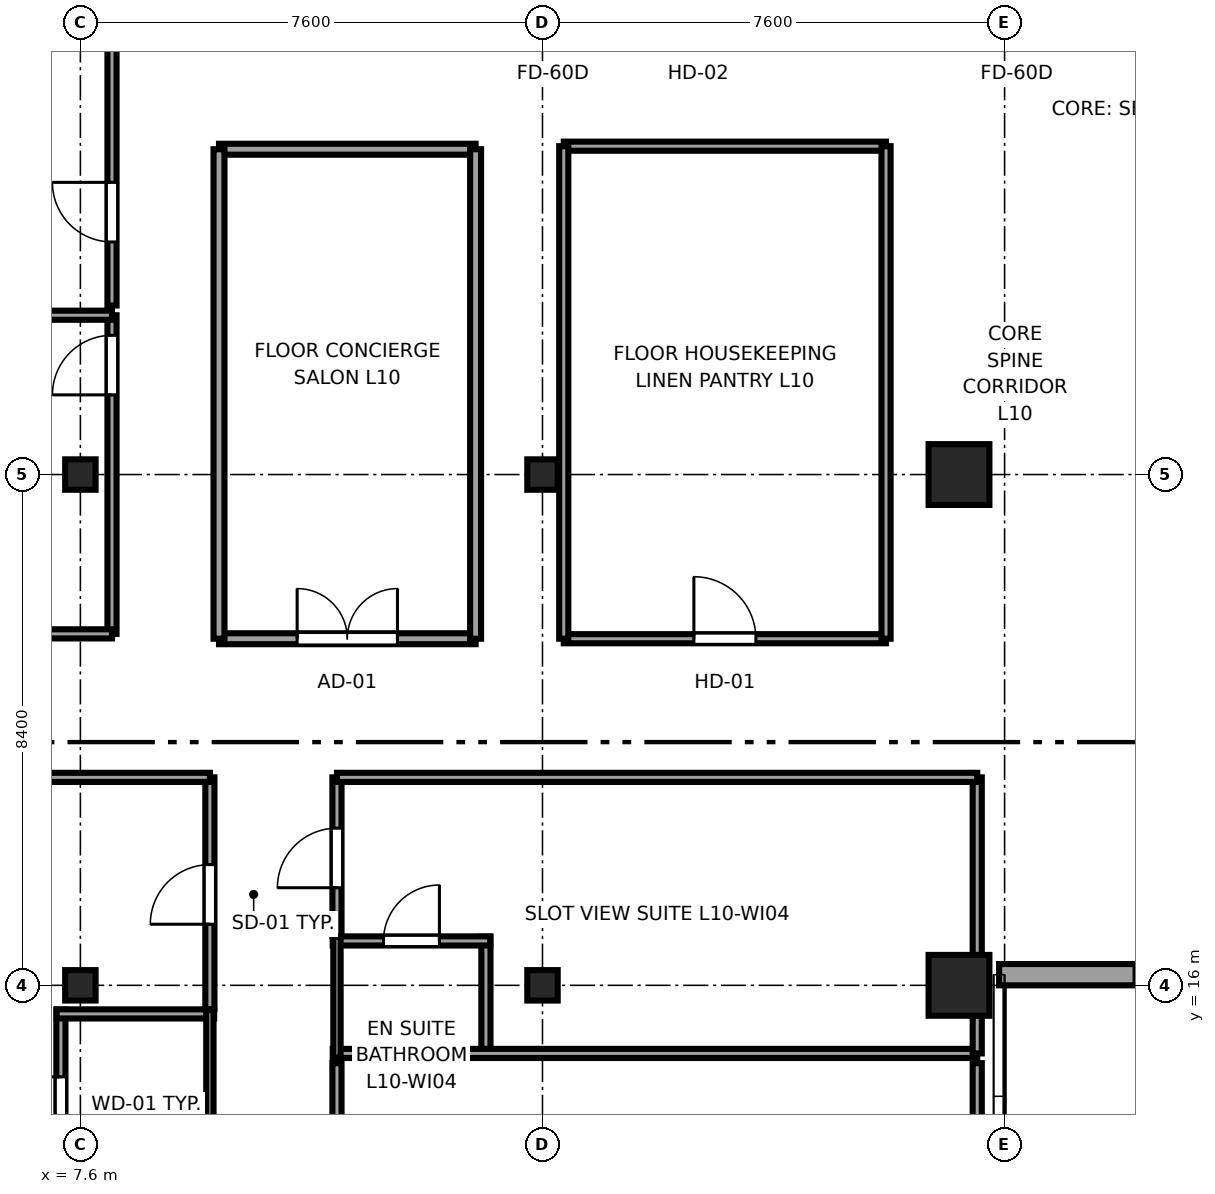
"""IFC4 building model, lengths in metres.
Left out: names, types, materials, properties, quantities, classifications, styles, units other than length and angle.
Written with IfcOpenShell. Run it as: python <this file> out.ifc"""

import sys

from ifc_helpers import new_model, si_unit, direction, frame, frame_2d, origin, origin_2d, place, context, subcontext, project, spatial, rectangle, i_section, extrude, source, transform, mapped, element, fill, save


model = new_model("IFC4")
c1 = context("Model", 3, precision=1e-05, world=origin(), true_north=direction((0.0, 1.0)))
c2 = subcontext(c1, "Body", "Model", "MODEL_VIEW")
j1 = project(units=[si_unit("LENGTHUNIT", "METRE"), si_unit("PLANEANGLEUNIT", "RADIAN")], contexts=[c1])
p1 = place(None, origin())
s1 = spatial("IfcSite", under=j1, at=p1, CompositionType="ELEMENT")
p2 = place(p1, origin())
s2 = spatial("IfcBuilding", under=s1, at=p2, CompositionType="ELEMENT")
p3 = place(p2, frame((0.0, 0.0, 46.2)))
s3 = spatial("IfcBuildingStorey", under=s2, at=p3, CompositionType="ELEMENT", Elevation=46.2)
m1 = source(origin(), c2, "Body", "SweptSolid", [
    extrude(i_section(OverallWidth=0.5, OverallDepth=0.5, WebThickness=0.028, FlangeThickness=0.045, at=origin_2d()), origin(), (0.0, 0.0, 1.0), 3.55),
])
for number, where, z_axis, x_axis in (
    (1, (7.6, 16.0, 0.0), (0.0, 0.0, 1.0), (1.0, 0.0, 0.0)),
    (2, (7.6, 24.4, 0.0), (0.0, 0.0, 1.0), (1.0, 0.0, 0.0)),
    (3, (15.2, 16.0, 0.0), (0.0, 0.0, 1.0), (1.0, 0.0, 0.0)),
    (4, (15.2, 24.4, 0.0), (0.0, 0.0, 1.0), (1.0, 0.0, 0.0)),
):
    element("IfcColumn", number, at=place(p3, frame(where, z_axis=z_axis, x_axis=x_axis)), inside=s3, PredefinedType="COLUMN", context=c2, shape_type="MappedRepresentation", body=[
        mapped(m1, transform((0.0, 0.0, 0.0), x_axis=(1.0, 0.0, 0.0), y_axis=(0.0, 1.0, 0.0), z_axis=(0.0, 0.0, 1.0), scale=1.0)),
    ])
m2 = source(origin(), c2, "Body", "SweptSolid", [
    extrude(rectangle(XDim=1.0, YDim=1.0, at=origin_2d()), origin(), (0.0, 0.0, 1.0), 3.55),
])
for number, where, z_axis, x_axis in (
    (5, (22.05, 16.0, 0.0), (0.0, 0.0, 1.0), (1.0, 0.0, 0.0)),
    (6, (22.05, 24.4, 0.0), (0.0, 0.0, 1.0), (1.0, 0.0, 0.0)),
):
    element("IfcColumn", number, at=place(p3, frame(where, z_axis=z_axis, x_axis=x_axis)), inside=s3, PredefinedType="COLUMN", context=c2, shape_type="MappedRepresentation", body=[
        mapped(m2, transform((0.0, 0.0, 0.0), x_axis=(1.0, 0.0, 0.0), y_axis=(0.0, 1.0, 0.0), z_axis=(0.0, 0.0, 1.0), scale=1.0)),
    ])
p4 = place(p3, frame((22.71, 16.175, 0.0), z_axis=(0.0, 0.0, 1.0), x_axis=(1.0, 0.0, 0.0)))
e7 = element("IfcWall", 7, at=p4, inside=s3, PredefinedType="SOLIDWALL", context=c2, shape_type="SweptSolid", body=[
    extrude(rectangle(XDim=11.58, YDim=0.35, at=frame_2d((5.79, 0.0))), origin(), (0.0, 0.0, 1.0), 2.748),
])
p5 = place(p4, frame((2.22, 0.0, 0.68)))
e8 = element("IfcOpeningElement", 8, at=p5, cuts=e7, PredefinedType="OPENING", context=c2, shape_type="SweptSolid", body=[
    extrude(rectangle(XDim=1.95, YDim=1.82, at=frame_2d((0.975, 0.91))), frame((0.0, 0.185, 0.0), z_axis=(0.0, -1.0, 0.0), x_axis=(1.0, 0.0, 0.0)), (0.0, 0.0, 1.0), 0.37),
])
p6 = place(p4, frame((7.41, 0.0, 0.68)))
e9 = element("IfcOpeningElement", 9, at=p6, cuts=e7, PredefinedType="OPENING", context=c2, shape_type="SweptSolid", body=[
    extrude(rectangle(XDim=1.95, YDim=1.82, at=frame_2d((0.975, 0.91))), frame((0.0, 0.185, 0.0), z_axis=(0.0, -1.0, 0.0), x_axis=(1.0, 0.0, 0.0)), (0.0, 0.0, 1.0), 0.37),
])
p7 = place(p3, frame((7.28, 13.21, 0.0), z_axis=(0.0, 0.0, 1.0), x_axis=(0.0, 1.0, 0.0)))
e10 = element("IfcWall", 10, at=p7, inside=s3, PredefinedType="PARTITIONING", context=c2, shape_type="SweptSolid", body=[
    extrude(rectangle(XDim=2.39, YDim=0.15, at=frame_2d((1.195, 0.0))), origin(), (0.0, 0.0, 1.0), 3.37),
])
p8 = place(p7, frame((0.365, 0.0, 0.0)))
e11 = element("IfcOpeningElement", 11, at=p8, cuts=e10, PredefinedType="OPENING", context=c2, shape_type="SweptSolid", body=[
    extrude(rectangle(XDim=0.92, YDim=2.01, at=frame_2d((0.46, 1.005))), frame((0.0, 0.085, 0.0), z_axis=(0.0, -1.0, 0.0), x_axis=(1.0, 0.0, 0.0)), (0.0, 0.0, 1.0), 0.17),
])
p9 = place(p3, frame((7.21, 15.53, 0.0), z_axis=(0.0, 0.0, 1.0), x_axis=(1.0, 0.0, 0.0)))
e12 = element("IfcWall", 12, at=p9, inside=s3, PredefinedType="PARTITIONING", context=c2, shape_type="SweptSolid", body=[
    extrude(rectangle(XDim=2.59, YDim=0.15, at=frame_2d((1.295, 0.0))), origin(), (0.0, 0.0, 1.0), 3.37),
])
p10 = place(p3, frame((9.73, 13.21, 0.0), z_axis=(0.0, 0.0, 1.0), x_axis=(0.0, 1.0, 0.0)))
e13 = element("IfcWall", 13, at=p10, inside=s3, PredefinedType="PLUMBINGWALL", context=c2, shape_type="SweptSolid", body=[
    extrude(rectangle(XDim=2.39, YDim=0.12, at=frame_2d((1.195, 0.0))), origin(), (0.0, 0.0, 1.0), 3.37),
])
p11 = place(p3, frame((14.27, 14.81, 0.0), z_axis=(0.0, 0.0, 1.0), x_axis=(0.0, 1.0, 0.0)))
e14 = element("IfcWall", 14, at=p11, inside=s3, PredefinedType="PARTITIONING", context=c2, shape_type="SweptSolid", body=[
    extrude(rectangle(XDim=1.99, YDim=0.15, at=frame_2d((0.995, 0.0))), origin(), (0.0, 0.0, 1.0), 3.37),
])
p12 = place(p3, frame((11.75, 14.88, 0.0), z_axis=(0.0, 0.0, 1.0), x_axis=(1.0, 0.0, 0.0)))
e15 = element("IfcWall", 15, at=p12, inside=s3, PredefinedType="PARTITIONING", context=c2, shape_type="SweptSolid", body=[
    extrude(rectangle(XDim=10.6, YDim=0.15, at=frame_2d((5.3, 0.0))), origin(), (0.0, 0.0, 1.0), 3.37),
])
p13 = place(p3, frame((11.75, 16.73, 0.0), z_axis=(0.0, 0.0, 1.0), x_axis=(1.0, 0.0, 0.0)))
e16 = element("IfcWall", 16, at=p13, inside=s3, PredefinedType="PARTITIONING", context=c2, shape_type="SweptSolid", body=[
    extrude(rectangle(XDim=2.59, YDim=0.15, at=frame_2d((1.295, 0.0))), origin(), (0.0, 0.0, 1.0), 3.37),
])
p14 = place(p13, frame((0.835, 0.0, 0.0)))
e17 = element("IfcOpeningElement", 17, at=p14, cuts=e16, PredefinedType="OPENING", context=c2, shape_type="SweptSolid", body=[
    extrude(rectangle(XDim=0.92, YDim=2.01, at=frame_2d((0.46, 1.005))), frame((0.0, 0.085, 0.0), z_axis=(0.0, -1.0, 0.0), x_axis=(1.0, 0.0, 0.0)), (0.0, 0.0, 1.0), 0.17),
])
p15 = place(p3, frame((11.82, 14.81, 0.0), z_axis=(0.0, 0.0, 1.0), x_axis=(0.0, 1.0, 0.0)))
e18 = element("IfcWall", 18, at=p15, inside=s3, PredefinedType="PLUMBINGWALL", context=c2, shape_type="SweptSolid", body=[
    extrude(rectangle(XDim=1.99, YDim=0.12, at=frame_2d((0.995, 0.0))), origin(), (0.0, 0.0, 1.0), 3.37),
])
p16 = place(p3, frame((9.73, 15.61, 0.0), z_axis=(0.0, 0.0, 1.0), x_axis=(0.0, 1.0, 0.0)))
e19 = element("IfcWall", 19, at=p16, inside=s3, PredefinedType="PARTITIONING", context=c2, shape_type="SweptSolid", body=[
    extrude(rectangle(XDim=3.81, YDim=0.15, at=frame_2d((1.905, 0.0))), origin(), (0.0, 0.0, 1.0), 3.37),
])
p17 = place(p16, frame((1.395, 0.0, 0.0)))
e20 = element("IfcOpeningElement", 20, at=p17, cuts=e19, PredefinedType="OPENING", context=c2, shape_type="SweptSolid", body=[
    extrude(rectangle(XDim=0.98, YDim=2.12, at=frame_2d((0.49, 1.06))), frame((0.0, 0.085, 0.0), z_axis=(0.0, -1.0, 0.0), x_axis=(1.0, 0.0, 0.0)), (0.0, 0.0, 1.0), 0.17),
])
p18 = place(p3, frame((0.405, 19.42, 0.0), z_axis=(0.0, 0.0, 1.0), x_axis=(1.0, 0.0, 0.0)))
e21 = element("IfcWall", 21, at=p18, inside=s3, PredefinedType="PARTITIONING", context=c2, shape_type="SweptSolid", body=[
    extrude(rectangle(XDim=9.325, YDim=0.15, at=frame_2d((4.663, 0.0))), origin(), (0.0, 0.0, 1.0), 3.37),
])
p19 = place(p3, frame((11.82, 12.01, 0.0), z_axis=(0.0, 0.0, 1.0), x_axis=(0.0, 1.0, 0.0)))
e22 = element("IfcWall", 22, at=p19, inside=s3, PredefinedType="PARTITIONING", context=c2, shape_type="SweptSolid", body=[
    extrude(rectangle(XDim=2.71, YDim=0.15, at=frame_2d((1.355, 0.0))), origin(), (0.0, 0.0, 1.0), 3.37),
])
p20 = place(p19, frame((0.845, 0.0, 0.0)))
e23 = element("IfcOpeningElement", 23, at=p20, cuts=e22, PredefinedType="OPENING", context=c2, shape_type="SweptSolid", body=[
    extrude(rectangle(XDim=0.98, YDim=2.12, at=frame_2d((0.49, 1.06))), frame((0.0, 0.085, 0.0), z_axis=(0.0, -1.0, 0.0), x_axis=(1.0, 0.0, 0.0)), (0.0, 0.0, 1.0), 0.17),
])
p21 = place(p3, frame((22.35, 10.08, 0.0), z_axis=(0.0, 0.0, 1.0), x_axis=(0.0, 1.0, 0.0)))
e24 = element("IfcWall", 24, at=p21, inside=s3, PredefinedType="PARTITIONING", context=c2, shape_type="SweptSolid", body=[
    extrude(rectangle(XDim=4.64, YDim=0.15, at=frame_2d((2.32, 0.0))), origin(), (0.0, 0.0, 1.0), 3.37),
])
p22 = place(p3, frame((11.82, 16.81, 0.0), z_axis=(0.0, 0.0, 1.0), x_axis=(0.0, 1.0, 0.0)))
e25 = element("IfcWall", 25, at=p22, inside=s3, PredefinedType="PARTITIONING", context=c2, shape_type="SweptSolid", body=[
    extrude(rectangle(XDim=2.61, YDim=0.15, at=frame_2d((1.305, 0.0))), origin(), (0.0, 0.0, 1.0), 3.37),
])
p23 = place(p22, frame((0.795, 0.0, 0.0)))
e26 = element("IfcOpeningElement", 26, at=p23, cuts=e25, PredefinedType="OPENING", context=c2, shape_type="SweptSolid", body=[
    extrude(rectangle(XDim=0.98, YDim=2.12, at=frame_2d((0.49, 1.06))), frame((0.0, 0.085, 0.0), z_axis=(0.0, -1.0, 0.0), x_axis=(1.0, 0.0, 0.0)), (0.0, 0.0, 1.0), 0.17),
])
p24 = place(p3, frame((22.35, 14.88, 0.0), z_axis=(0.0, 0.0, 1.0), x_axis=(0.0, 1.0, 0.0)))
e27 = element("IfcWall", 27, at=p24, inside=s3, PredefinedType="PARTITIONING", context=c2, shape_type="SweptSolid", body=[
    extrude(rectangle(XDim=4.54, YDim=0.15, at=frame_2d((2.27, 0.0))), origin(), (0.0, 0.0, 1.0), 3.37),
])
p25 = place(p3, frame((11.82, 19.42, 0.0), z_axis=(0.0, 0.0, 1.0), x_axis=(1.0, 0.0, 0.0)))
e28 = element("IfcWall", 28, at=p25, inside=s3, PredefinedType="PARTITIONING", context=c2, shape_type="SweptSolid", body=[
    extrude(rectangle(XDim=10.53, YDim=0.15, at=frame_2d((5.265, 0.0))), origin(), (0.0, 0.0, 1.0), 3.37),
])
p26 = place(p3, frame((8.12, 21.78, 0.0), z_axis=(0.0, 0.0, 1.0), x_axis=(0.0, 1.0, 0.0)))
e29 = element("IfcWall", 29, at=p26, inside=s3, PredefinedType="PARTITIONING", context=c2, shape_type="SweptSolid", body=[
    extrude(rectangle(XDim=5.24, YDim=0.15, at=frame_2d((2.62, 0.0))), origin(), (0.0, 0.0, 1.0), 3.37),
])
p27 = place(p26, frame((3.93, 0.0, 0.0)))
e30 = element("IfcOpeningElement", 30, at=p27, cuts=e29, PredefinedType="OPENING", context=c2, shape_type="SweptSolid", body=[
    extrude(rectangle(XDim=0.98, YDim=2.12, at=frame_2d((0.49, 1.06))), frame((0.0, 0.085, 0.0), z_axis=(0.0, -1.0, 0.0), x_axis=(1.0, 0.0, 0.0)), (0.0, 0.0, 1.0), 0.17),
])
p28 = place(p3, frame((0.405, 21.78, 0.0), z_axis=(0.0, 0.0, 1.0), x_axis=(1.0, 0.0, 0.0)))
e31 = element("IfcWall", 31, at=p28, inside=s3, PredefinedType="PARTITIONING", context=c2, shape_type="SweptSolid", body=[
    extrude(rectangle(XDim=7.715, YDim=0.15, at=frame_2d((3.857, 0.0))), origin(), (0.0, 0.0, 1.0), 3.37),
])
p29 = place(p3, frame((2.77, 27.02, 0.0), z_axis=(0.0, 0.0, 1.0), x_axis=(1.0, 0.0, 0.0)))
e32 = element("IfcWall", 32, at=p29, inside=s3, PredefinedType="PARTITIONING", context=c2, shape_type="SweptSolid", body=[
    extrude(rectangle(XDim=5.35, YDim=0.15, at=frame_2d((2.675, 0.0))), origin(), (0.0, 0.0, 1.0), 3.37),
])
p30 = place(p3, frame((8.12, 27.18, 0.0), z_axis=(0.0, 0.0, 1.0), x_axis=(0.0, 1.0, 0.0)))
e33 = element("IfcWall", 33, at=p30, inside=s3, PredefinedType="PARTITIONING", context=c2, shape_type="SweptSolid", body=[
    extrude(rectangle(XDim=18.415, YDim=0.15, at=frame_2d((9.208, 0.0))), origin(), (0.0, 0.0, 1.0), 3.37),
])
p31 = place(p30, frame((1.045, 0.0, 0.0)))
e34 = element("IfcOpeningElement", 34, at=p31, cuts=e33, PredefinedType="OPENING", context=c2, shape_type="SweptSolid", body=[
    extrude(rectangle(XDim=0.98, YDim=2.12, at=frame_2d((0.49, 1.06))), frame((0.0, 0.085, 0.0), z_axis=(0.0, -1.0, 0.0), x_axis=(1.0, 0.0, 0.0)), (0.0, 0.0, 1.0), 0.17),
])
p32 = place(p3, frame((9.88, 21.7, 0.0), z_axis=(0.0, 0.0, 1.0), x_axis=(1.0, 0.0, 0.0)))
e35 = element("IfcWall", 35, at=p32, inside=s3, PredefinedType="PARTITIONING", context=c2, shape_type="SweptSolid", body=[
    extrude(rectangle(XDim=4.22, YDim=0.18, at=frame_2d((2.11, 0.0))), origin(), (0.0, 0.0, 1.0), 3.37),
])
p33 = place(p32, frame((1.285, 0.0, 0.0)))
e36 = element("IfcOpeningElement", 36, at=p33, cuts=e35, PredefinedType="OPENING", context=c2, shape_type="SweptSolid", body=[
    extrude(rectangle(XDim=1.65, YDim=2.15, at=frame_2d((0.825, 1.075))), frame((0.0, 0.1, 0.0), z_axis=(0.0, -1.0, 0.0), x_axis=(1.0, 0.0, 0.0)), (0.0, 0.0, 1.0), 0.2),
])
p34 = place(p3, frame((9.88, 29.75, 0.0), z_axis=(0.0, 0.0, 1.0), x_axis=(1.0, 0.0, 0.0)))
e37 = element("IfcWall", 37, at=p34, inside=s3, PredefinedType="PARTITIONING", context=c2, shape_type="SweptSolid", body=[
    extrude(rectangle(XDim=4.22, YDim=0.18, at=frame_2d((2.11, 0.0))), origin(), (0.0, 0.0, 1.0), 3.37),
])
for number, where, z_axis, x_axis in (
    (38, (9.88, 21.7, 0.0), (0.0, 0.0, 1.0), (0.0, 1.0, 0.0)),
    (39, (14.1, 21.7, 0.0), (0.0, 0.0, 1.0), (0.0, 1.0, 0.0)),
):
    element("IfcWall", number, at=place(p3, frame(where, z_axis=z_axis, x_axis=x_axis)), inside=s3, PredefinedType="PARTITIONING", context=c2, shape_type="SweptSolid", body=[
        extrude(rectangle(XDim=8.05, YDim=0.18, at=frame_2d((4.025, 0.0))), origin(), (0.0, 0.0, 1.0), 3.37),
    ])
p35 = place(p3, frame((15.55, 21.7, 0.0), z_axis=(0.0, 0.0, 1.0), x_axis=(1.0, 0.0, 0.0)))
e40 = element("IfcWall", 40, at=p35, inside=s3, PredefinedType="PARTITIONING", context=c2, shape_type="SweptSolid", body=[
    extrude(rectangle(XDim=5.3, YDim=0.15, at=frame_2d((2.65, 0.0))), origin(), (0.0, 0.0, 1.0), 3.37),
])
p36 = place(p35, frame((2.14, 0.0, 0.0)))
e41 = element("IfcOpeningElement", 41, at=p36, cuts=e40, PredefinedType="OPENING", context=c2, shape_type="SweptSolid", body=[
    extrude(rectangle(XDim=1.02, YDim=2.03, at=frame_2d((0.51, 1.015))), frame((0.0, 0.085, 0.0), z_axis=(0.0, -1.0, 0.0), x_axis=(1.0, 0.0, 0.0)), (0.0, 0.0, 1.0), 0.17),
])
p37 = place(p3, frame((15.55, 29.8, 0.0), z_axis=(0.0, 0.0, 1.0), x_axis=(1.0, 0.0, 0.0)))
e42 = element("IfcWall", 42, at=p37, inside=s3, PredefinedType="PARTITIONING", context=c2, shape_type="SweptSolid", body=[
    extrude(rectangle(XDim=5.3, YDim=0.15, at=frame_2d((2.65, 0.0))), origin(), (0.0, 0.0, 1.0), 3.37),
])
for number, where, z_axis, x_axis in (
    (43, (15.55, 21.7, 0.0), (0.0, 0.0, 1.0), (0.0, 1.0, 0.0)),
    (44, (20.85, 21.7, 0.0), (0.0, 0.0, 1.0), (0.0, 1.0, 0.0)),
):
    element("IfcWall", number, at=place(p3, frame(where, z_axis=z_axis, x_axis=x_axis)), inside=s3, PredefinedType="PARTITIONING", context=c2, shape_type="SweptSolid", body=[
        extrude(rectangle(XDim=8.1, YDim=0.15, at=frame_2d((4.05, 0.0))), origin(), (0.0, 0.0, 1.0), 3.37),
    ])
m3 = source(origin(), c2, "Body", "SweptSolid", [
    extrude(rectangle(XDim=1.95, YDim=1.82, at=frame_2d((0.975, 0.91))), frame((0.0, 0.09, 0.0), z_axis=(0.0, -1.0, 0.0), x_axis=(1.0, 0.0, 0.0)), (0.0, 0.0, 1.0), 0.06),
])
p38 = place(p5, origin())
e45 = element("IfcWindow", 45, at=p38, inside=s3, PartitioningType="DOUBLE_PANEL_VERTICAL", PredefinedType="WINDOW", context=c2, shape_type="MappedRepresentation", body=[
    mapped(m3, transform((0.0, 0.0, 0.0), x_axis=(1.0, 0.0, 0.0), y_axis=(0.0, 1.0, 0.0), z_axis=(0.0, 0.0, 1.0), scale=1.0)),
])
fill(e8, e45)
m4 = source(origin(), c2, "Body", "SweptSolid", [
    extrude(rectangle(XDim=0.92, YDim=2.01, at=frame_2d((0.46, 1.005))), frame((0.0, 0.025, 0.0), z_axis=(0.0, -1.0, 0.0), x_axis=(1.0, 0.0, 0.0)), (0.0, 0.0, 1.0), 0.05),
])
p39 = place(p8, origin())
e46 = element("IfcDoor", 46, at=p39, inside=s3, OperationType="SINGLE_SWING_RIGHT", PredefinedType="DOOR", context=c2, shape_type="MappedRepresentation", body=[
    mapped(m4, transform((0.0, 0.0, 0.0), x_axis=(1.0, 0.0, 0.0), y_axis=(0.0, 1.0, 0.0), z_axis=(0.0, 0.0, 1.0), scale=1.0)),
])
fill(e11, e46)
p40 = place(p14, origin())
e47 = element("IfcDoor", 47, at=p40, inside=s3, OperationType="SINGLE_SWING_RIGHT", PredefinedType="DOOR", context=c2, shape_type="MappedRepresentation", body=[
    mapped(m4, transform((0.0, 0.0, 0.0), x_axis=(1.0, 0.0, 0.0), y_axis=(0.0, 1.0, 0.0), z_axis=(0.0, 0.0, 1.0), scale=1.0)),
])
fill(e17, e47)
m5 = source(origin(), c2, "Body", "SweptSolid", [
    extrude(rectangle(XDim=0.98, YDim=2.12, at=frame_2d((0.49, 1.06))), frame((0.0, 0.025, 0.0), z_axis=(0.0, -1.0, 0.0), x_axis=(1.0, 0.0, 0.0)), (0.0, 0.0, 1.0), 0.05),
])
p41 = place(p17, origin())
e48 = element("IfcDoor", 48, at=p41, inside=s3, OperationType="SINGLE_SWING_LEFT", PredefinedType="DOOR", context=c2, shape_type="MappedRepresentation", body=[
    mapped(m5, transform((0.0, 0.0, 0.0), x_axis=(1.0, 0.0, 0.0), y_axis=(0.0, 1.0, 0.0), z_axis=(0.0, 0.0, 1.0), scale=1.0)),
])
fill(e20, e48)
p42 = place(p23, origin())
e49 = element("IfcDoor", 49, at=p42, inside=s3, OperationType="SINGLE_SWING_LEFT", PredefinedType="DOOR", context=c2, shape_type="MappedRepresentation", body=[
    mapped(m5, transform((0.0, 0.0, 0.0), x_axis=(1.0, 0.0, 0.0), y_axis=(0.0, 1.0, 0.0), z_axis=(0.0, 0.0, 1.0), scale=1.0)),
])
fill(e26, e49)
p43 = place(p27, origin())
e50 = element("IfcDoor", 50, at=p43, inside=s3, OperationType="SINGLE_SWING_LEFT", PredefinedType="DOOR", context=c2, shape_type="MappedRepresentation", body=[
    mapped(m5, transform((0.0, 0.0, 0.0), x_axis=(1.0, 0.0, 0.0), y_axis=(0.0, 1.0, 0.0), z_axis=(0.0, 0.0, 1.0), scale=1.0)),
])
fill(e30, e50)
p44 = place(p31, origin())
e51 = element("IfcDoor", 51, at=p44, inside=s3, OperationType="SINGLE_SWING_RIGHT", PredefinedType="DOOR", context=c2, shape_type="MappedRepresentation", body=[
    mapped(m5, transform((0.0, 0.0, 0.0), x_axis=(1.0, 0.0, 0.0), y_axis=(0.0, 1.0, 0.0), z_axis=(0.0, 0.0, 1.0), scale=1.0)),
])
fill(e34, e51)
m6 = source(origin(), c2, "Body", "SweptSolid", [
    extrude(rectangle(XDim=1.65, YDim=2.15, at=frame_2d((0.825, 1.075))), frame((0.0, 0.025, 0.0), z_axis=(0.0, -1.0, 0.0), x_axis=(1.0, 0.0, 0.0)), (0.0, 0.0, 1.0), 0.05),
])
p45 = place(p33, origin())
e52 = element("IfcDoor", 52, at=p45, inside=s3, OperationType="DOUBLE_DOOR_SINGLE_SWING", PredefinedType="DOOR", context=c2, shape_type="MappedRepresentation", body=[
    mapped(m6, transform((0.0, 0.0, 0.0), x_axis=(1.0, 0.0, 0.0), y_axis=(0.0, 1.0, 0.0), z_axis=(0.0, 0.0, 1.0), scale=1.0)),
])
fill(e36, e52)
m7 = source(origin(), c2, "Body", "SweptSolid", [
    extrude(rectangle(XDim=1.02, YDim=2.03, at=frame_2d((0.51, 1.015))), frame((0.0, 0.025, 0.0), z_axis=(0.0, -1.0, 0.0), x_axis=(1.0, 0.0, 0.0)), (0.0, 0.0, 1.0), 0.05),
])
p46 = place(p36, origin())
e53 = element("IfcDoor", 53, at=p46, inside=s3, OperationType="SINGLE_SWING_LEFT", PredefinedType="DOOR", context=c2, shape_type="MappedRepresentation", body=[
    mapped(m7, transform((0.0, 0.0, 0.0), x_axis=(1.0, 0.0, 0.0), y_axis=(0.0, 1.0, 0.0), z_axis=(0.0, 0.0, 1.0), scale=1.0)),
])
fill(e41, e53)
save(model, sys.argv[1])
